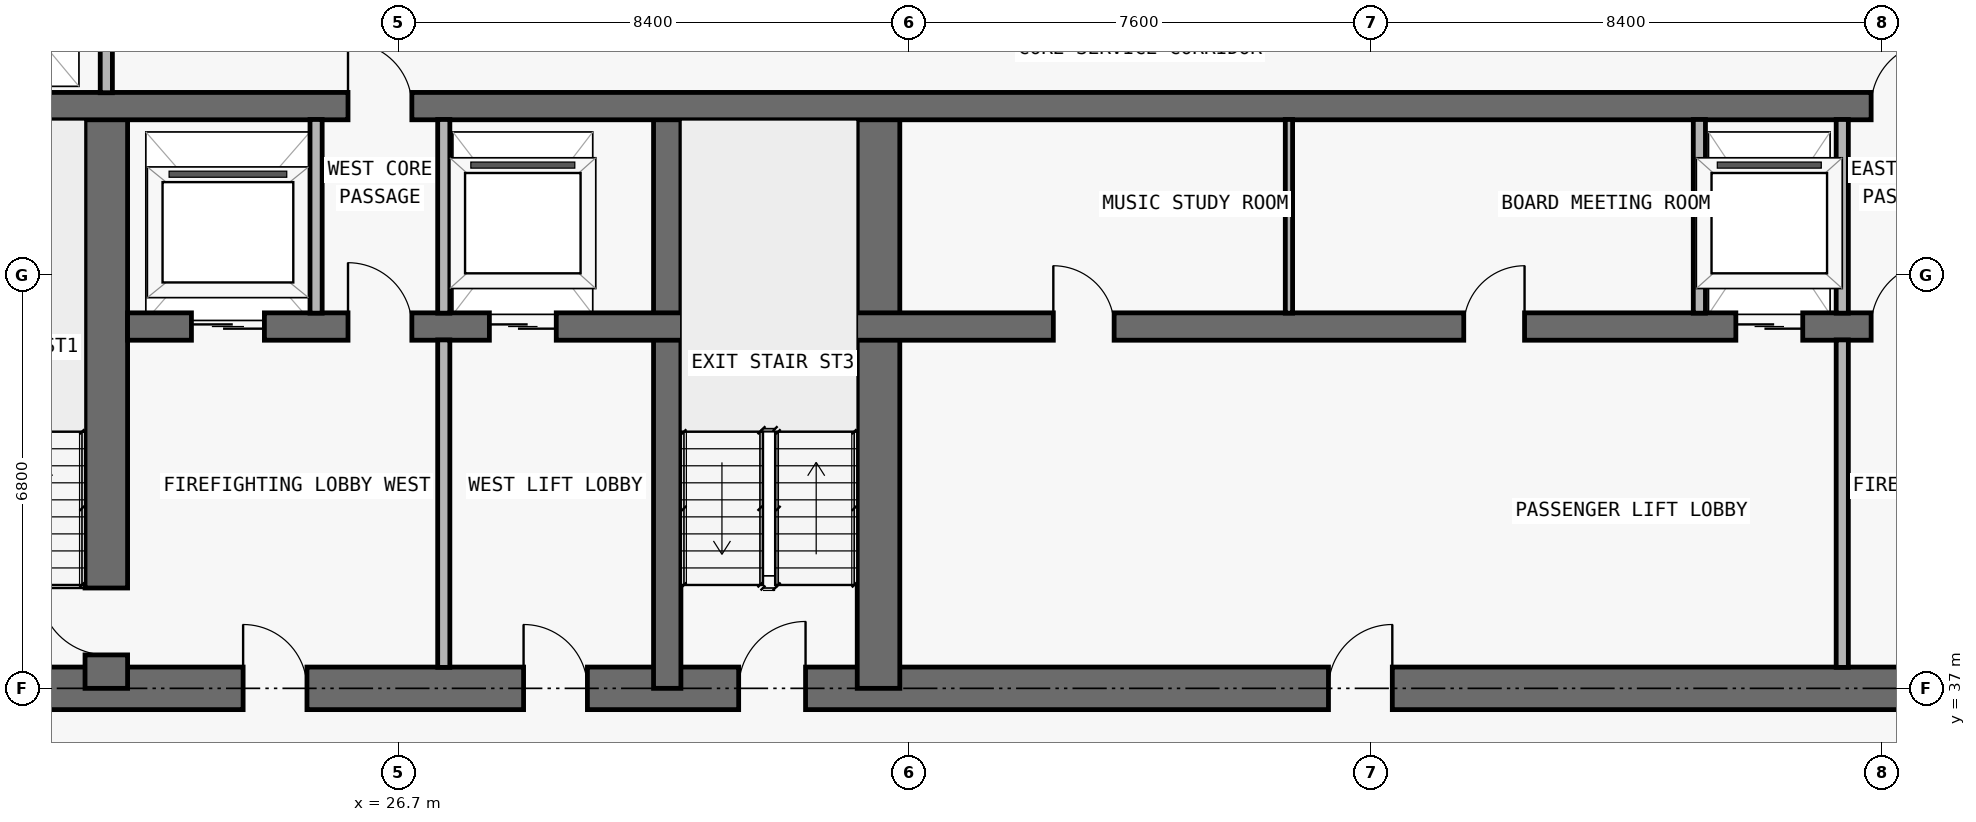
"""IFC4 building model, lengths in metres.
Left out: names, types, materials, properties, quantities, classifications, styles, units other than length and angle.
Written with IfcOpenShell. Run it as: python <this file> out.ifc"""

import sys

from ifc_helpers import new_model, si_unit, direction, frame, frame_2d, origin, place, context, subcontext, project, spatial, rectangle, extrude, element, fill, save


model = new_model("IFC4")
c1 = context("Model", 3, precision=1e-05, world=origin(), true_north=direction((0.0, 1.0)))
c2 = subcontext(c1, "Body", "Model", "MODEL_VIEW")
j1 = project(units=[si_unit("LENGTHUNIT", "METRE"), si_unit("PLANEANGLEUNIT", "RADIAN")], contexts=[c1])
p1 = place(None, origin())
s1 = spatial("IfcSite", under=j1, at=p1, CompositionType="ELEMENT")
p2 = place(p1, origin())
s2 = spatial("IfcBuilding", under=s1, at=p2, CompositionType="ELEMENT")
p3 = place(p2, frame((0.0, 0.0, 208.2)))
s3 = spatial("IfcBuildingStorey", under=s2, at=p3, CompositionType="ELEMENT", Elevation=208.2)
p4 = place(p3, frame((17.95, 37.0, 0.0), z_axis=(0.0, 0.0, 1.0), x_axis=(1.0, 0.0, 0.0)))
e1 = element("IfcWall", 1, at=p4, inside=s3, PredefinedType="SHEAR", context=c2, shape_type="SweptSolid", body=[
    extrude(rectangle(XDim=41.9, YDim=0.7, at=frame_2d((20.95, 0.0))), origin(), (0.0, 0.0, 1.0), 3.05),
])
p5 = place(p4, frame((14.35, 0.0, 0.0)))
e2 = element("IfcOpeningElement", 2, at=p5, cuts=e1, PredefinedType="OPENING", context=c2, shape_type="SweptSolid", body=[
    extrude(rectangle(XDim=1.1, YDim=2.15, at=frame_2d((0.55, 1.075))), frame((0.0, 0.36, 0.0), z_axis=(0.0, -1.0, 0.0), x_axis=(1.0, 0.0, 0.0)), (0.0, 0.0, 1.0), 0.72),
])
p6 = place(p4, frame((6.2, 0.0, 0.0)))
e3 = element("IfcOpeningElement", 3, at=p6, cuts=e1, PredefinedType="OPENING", context=c2, shape_type="SweptSolid", body=[
    extrude(rectangle(XDim=1.05, YDim=2.15, at=frame_2d((0.525, 1.075))), frame((0.0, 0.36, 0.0), z_axis=(0.0, -1.0, 0.0), x_axis=(1.0, 0.0, 0.0)), (0.0, 0.0, 1.0), 0.72),
])
p7 = place(p4, frame((34.7, 0.0, 0.0)))
e4 = element("IfcOpeningElement", 4, at=p7, cuts=e1, PredefinedType="OPENING", context=c2, shape_type="SweptSolid", body=[
    extrude(rectangle(XDim=1.05, YDim=2.15, at=frame_2d((0.525, 1.075))), frame((0.0, 0.36, 0.0), z_axis=(0.0, -1.0, 0.0), x_axis=(1.0, 0.0, 0.0)), (0.0, 0.0, 1.0), 0.72),
])
p8 = place(p4, frame((10.812, 0.0, 0.0)))
e5 = element("IfcOpeningElement", 5, at=p8, cuts=e1, PredefinedType="OPENING", context=c2, shape_type="SweptSolid", body=[
    extrude(rectangle(XDim=1.05, YDim=2.15, at=frame_2d((0.525, 1.075))), frame((0.0, 0.36, 0.0), z_axis=(0.0, -1.0, 0.0), x_axis=(1.0, 0.0, 0.0)), (0.0, 0.0, 1.0), 0.72),
])
p9 = place(p4, frame((24.05, 0.0, 0.0)))
e6 = element("IfcOpeningElement", 6, at=p9, cuts=e1, PredefinedType="OPENING", context=c2, shape_type="SweptSolid", body=[
    extrude(rectangle(XDim=1.05, YDim=2.15, at=frame_2d((0.525, 1.075))), frame((0.0, 0.36, 0.0), z_axis=(0.0, -1.0, 0.0), x_axis=(1.0, 0.0, 0.0)), (0.0, 0.0, 1.0), 0.72),
])
p10 = place(p3, frame((21.9, 37.0, 0.0), z_axis=(0.0, 0.0, 1.0), x_axis=(0.0, 1.0, 0.0)))
e7 = element("IfcWall", 7, at=p10, inside=s3, PredefinedType="SHEAR", context=c2, shape_type="SweptSolid", body=[
    extrude(rectangle(XDim=9.575, YDim=0.7, at=frame_2d((4.788, 0.0))), origin(), (0.0, 0.0, 1.0), 3.05),
])
p11 = place(p10, frame((0.55, 0.0, 0.0)))
e8 = element("IfcOpeningElement", 8, at=p11, cuts=e7, PredefinedType="OPENING", context=c2, shape_type="SweptSolid", body=[
    extrude(rectangle(XDim=1.1, YDim=2.15, at=frame_2d((0.55, 1.075))), frame((0.0, 0.36, 0.0), z_axis=(0.0, -1.0, 0.0), x_axis=(1.0, 0.0, 0.0)), (0.0, 0.0, 1.0), 0.72),
])
p12 = place(p3, frame((31.125, 37.0, 0.0), z_axis=(0.0, 0.0, 1.0), x_axis=(0.0, 1.0, 0.0)))
e9 = element("IfcWall", 9, at=p12, inside=s3, PredefinedType="SHEAR", context=c2, shape_type="SweptSolid", body=[
    extrude(rectangle(XDim=9.575, YDim=0.45, at=frame_2d((4.788, 0.0))), origin(), (0.0, 0.0, 1.0), 3.05),
])
p13 = place(p3, frame((34.6, 37.0, 0.0), z_axis=(0.0, 0.0, 1.0), x_axis=(0.0, 1.0, 0.0)))
e10 = element("IfcWall", 10, at=p13, inside=s3, PredefinedType="SHEAR", context=c2, shape_type="SweptSolid", body=[
    extrude(rectangle(XDim=9.575, YDim=0.7, at=frame_2d((4.788, 0.0))), origin(), (0.0, 0.0, 1.0), 3.05),
])
p14 = place(p3, frame((22.25, 42.95, 0.0), z_axis=(0.0, 0.0, 1.0), x_axis=(1.0, 0.0, 0.0)))
e11 = element("IfcWall", 11, at=p14, inside=s3, PredefinedType="SHEAR", context=c2, shape_type="SweptSolid", body=[
    extrude(rectangle(XDim=33.3, YDim=0.45, at=frame_2d((16.65, 0.0))), origin(), (0.0, 0.0, 1.0), 3.05),
])
p15 = place(p14, frame((1.05, 0.0, 0.0)))
e12 = element("IfcOpeningElement", 12, at=p15, cuts=e11, PredefinedType="OPENING", context=c2, shape_type="SweptSolid", body=[
    extrude(rectangle(XDim=1.2, YDim=2.2, at=frame_2d((0.6, 1.1))), frame((0.0, 0.235, 0.0), z_axis=(0.0, -1.0, 0.0), x_axis=(1.0, 0.0, 0.0)), (0.0, 0.0, 1.0), 0.47),
])
p16 = place(p14, frame((31.05, 0.0, 0.0)))
e13 = element("IfcOpeningElement", 13, at=p16, cuts=e11, PredefinedType="OPENING", context=c2, shape_type="SweptSolid", body=[
    extrude(rectangle(XDim=1.2, YDim=2.2, at=frame_2d((0.6, 1.1))), frame((0.0, 0.235, 0.0), z_axis=(0.0, -1.0, 0.0), x_axis=(1.0, 0.0, 0.0)), (0.0, 0.0, 1.0), 0.47),
])
p17 = place(p14, frame((26.45, 0.0, 0.0)))
e14 = element("IfcOpeningElement", 14, at=p17, cuts=e11, PredefinedType="OPENING", context=c2, shape_type="SweptSolid", body=[
    extrude(rectangle(XDim=1.1, YDim=2.2, at=frame_2d((0.55, 1.1))), frame((0.0, 0.235, 0.0), z_axis=(0.0, -1.0, 0.0), x_axis=(1.0, 0.0, 0.0)), (0.0, 0.0, 1.0), 0.47),
])
p18 = place(p14, frame((5.95, 0.0, 0.0)))
e15 = element("IfcOpeningElement", 15, at=p18, cuts=e11, PredefinedType="OPENING", context=c2, shape_type="SweptSolid", body=[
    extrude(rectangle(XDim=1.1, YDim=2.2, at=frame_2d((0.55, 1.1))), frame((0.0, 0.235, 0.0), z_axis=(0.0, -1.0, 0.0), x_axis=(1.0, 0.0, 0.0)), (0.0, 0.0, 1.0), 0.47),
])
p19 = place(p14, frame((3.625, 0.0, 0.0)))
e16 = element("IfcOpeningElement", 16, at=p19, cuts=e11, PredefinedType="OPENING", context=c2, shape_type="SweptSolid", body=[
    extrude(rectangle(XDim=1.05, YDim=2.15, at=frame_2d((0.525, 1.075))), frame((0.0, 0.235, 0.0), z_axis=(0.0, -1.0, 0.0), x_axis=(1.0, 0.0, 0.0)), (0.0, 0.0, 1.0), 0.47),
])
p20 = place(p14, frame((28.675, 0.0, 0.0)))
e17 = element("IfcOpeningElement", 17, at=p20, cuts=e11, PredefinedType="OPENING", context=c2, shape_type="SweptSolid", body=[
    extrude(rectangle(XDim=1.05, YDim=2.15, at=frame_2d((0.525, 1.075))), frame((0.0, 0.235, 0.0), z_axis=(0.0, -1.0, 0.0), x_axis=(1.0, 0.0, 0.0)), (0.0, 0.0, 1.0), 0.47),
])
p21 = place(p14, frame((15.225, 0.0, 0.0)))
e18 = element("IfcOpeningElement", 18, at=p21, cuts=e11, PredefinedType="OPENING", context=c2, shape_type="SweptSolid", body=[
    extrude(rectangle(XDim=1.0, YDim=2.2, at=frame_2d((0.5, 1.1))), frame((0.0, 0.235, 0.0), z_axis=(0.0, -1.0, 0.0), x_axis=(1.0, 0.0, 0.0)), (0.0, 0.0, 1.0), 0.47),
])
p22 = place(p14, frame((21.975, 0.0, 0.0)))
e19 = element("IfcOpeningElement", 19, at=p22, cuts=e11, PredefinedType="OPENING", context=c2, shape_type="SweptSolid", body=[
    extrude(rectangle(XDim=1.0, YDim=2.2, at=frame_2d((0.5, 1.1))), frame((0.0, 0.235, 0.0), z_axis=(0.0, -1.0, 0.0), x_axis=(1.0, 0.0, 0.0)), (0.0, 0.0, 1.0), 0.47),
])
p23 = place(p3, frame((18.3, 46.575, 0.0), z_axis=(0.0, 0.0, 1.0), x_axis=(1.0, 0.0, 0.0)))
e20 = element("IfcWall", 20, at=p23, inside=s3, PredefinedType="SHEAR", context=c2, shape_type="SweptSolid", body=[
    extrude(rectangle(XDim=41.2, YDim=0.45, at=frame_2d((20.6, 0.0))), origin(), (0.0, 0.0, 1.0), 3.05),
])
p24 = place(p23, frame((7.575, 0.0, 0.0)))
e21 = element("IfcOpeningElement", 21, at=p24, cuts=e20, PredefinedType="OPENING", context=c2, shape_type="SweptSolid", body=[
    extrude(rectangle(XDim=1.05, YDim=2.15, at=frame_2d((0.525, 1.075))), frame((0.0, 0.235, 0.0), z_axis=(0.0, -1.0, 0.0), x_axis=(1.0, 0.0, 0.0)), (0.0, 0.0, 1.0), 0.47),
])
p25 = place(p23, frame((32.625, 0.0, 0.0)))
e22 = element("IfcOpeningElement", 22, at=p25, cuts=e20, PredefinedType="OPENING", context=c2, shape_type="SweptSolid", body=[
    extrude(rectangle(XDim=1.05, YDim=2.15, at=frame_2d((0.525, 1.075))), frame((0.0, 0.235, 0.0), z_axis=(0.0, -1.0, 0.0), x_axis=(1.0, 0.0, 0.0)), (0.0, 0.0, 1.0), 0.47),
])
p26 = place(p3, frame((21.9, 46.795, 0.0), z_axis=(0.0, 0.0, 1.0), x_axis=(0.0, 1.0, 0.0)))
e23 = element("IfcWall", 23, at=p26, inside=s3, PredefinedType="PARTITIONING", context=c2, shape_type="SweptSolid", body=[
    extrude(rectangle(XDim=3.16, YDim=0.2, at=frame_2d((1.58, 0.0))), origin(), (0.0, 0.0, 1.0), 3.05),
])
p27 = place(p3, frame((25.35, 43.17, 0.0), z_axis=(0.0, 0.0, 1.0), x_axis=(0.0, 1.0, 0.0)))
e24 = element("IfcWall", 24, at=p27, inside=s3, PredefinedType="PARTITIONING", context=c2, shape_type="SweptSolid", body=[
    extrude(rectangle(XDim=3.185, YDim=0.2, at=frame_2d((1.593, 0.0))), origin(), (0.0, 0.0, 1.0), 3.05),
])
p28 = place(p3, frame((27.45, 37.345, 0.0), z_axis=(0.0, 0.0, 1.0), x_axis=(0.0, 1.0, 0.0)))
e25 = element("IfcWall", 25, at=p28, inside=s3, PredefinedType="PARTITIONING", context=c2, shape_type="SweptSolid", body=[
    extrude(rectangle(XDim=5.385, YDim=0.2, at=frame_2d((2.692, 0.0))), origin(), (0.0, 0.0, 1.0), 3.05),
])
p29 = place(p3, frame((27.45, 43.17, 0.0), z_axis=(0.0, 0.0, 1.0), x_axis=(0.0, 1.0, 0.0)))
e26 = element("IfcWall", 26, at=p29, inside=s3, PredefinedType="PARTITIONING", context=c2, shape_type="SweptSolid", body=[
    extrude(rectangle(XDim=3.185, YDim=0.2, at=frame_2d((1.593, 0.0))), origin(), (0.0, 0.0, 1.0), 3.05),
])
p30 = place(p3, frame((41.35, 43.17, 0.0), z_axis=(0.0, 0.0, 1.0), x_axis=(0.0, 1.0, 0.0)))
e27 = element("IfcWall", 27, at=p30, inside=s3, PredefinedType="PARTITIONING", context=c2, shape_type="SweptSolid", body=[
    extrude(rectangle(XDim=3.185, YDim=0.12, at=frame_2d((1.593, 0.0))), origin(), (0.0, 0.0, 1.0), 3.05),
])
p31 = place(p3, frame((48.1, 43.17, 0.0), z_axis=(0.0, 0.0, 1.0), x_axis=(0.0, 1.0, 0.0)))
e28 = element("IfcWall", 28, at=p31, inside=s3, PredefinedType="PARTITIONING", context=c2, shape_type="SweptSolid", body=[
    extrude(rectangle(XDim=3.185, YDim=0.2, at=frame_2d((1.593, 0.0))), origin(), (0.0, 0.0, 1.0), 3.05),
])
p32 = place(p3, frame((50.45, 37.345, 0.0), z_axis=(0.0, 0.0, 1.0), x_axis=(0.0, 1.0, 0.0)))
e29 = element("IfcWall", 29, at=p32, inside=s3, PredefinedType="PARTITIONING", context=c2, shape_type="SweptSolid", body=[
    extrude(rectangle(XDim=5.385, YDim=0.2, at=frame_2d((2.692, 0.0))), origin(), (0.0, 0.0, 1.0), 3.05),
])
p33 = place(p3, frame((50.45, 43.17, 0.0), z_axis=(0.0, 0.0, 1.0), x_axis=(0.0, 1.0, 0.0)))
e30 = element("IfcWall", 30, at=p33, inside=s3, PredefinedType="PARTITIONING", context=c2, shape_type="SweptSolid", body=[
    extrude(rectangle(XDim=3.185, YDim=0.2, at=frame_2d((1.593, 0.0))), origin(), (0.0, 0.0, 1.0), 3.05),
])
p34 = place(p15, origin())
e31 = element("IfcDoor", 31, at=p34, inside=s3, OperationType="DOUBLE_DOOR_SLIDING", PredefinedType="DOOR", context=c2, shape_type="SweptSolid", body=[
    extrude(rectangle(XDim=1.2, YDim=2.2, at=frame_2d((0.6, 1.1))), frame((0.0, 0.025, 0.0), z_axis=(0.0, -1.0, 0.0), x_axis=(1.0, 0.0, 0.0)), (0.0, 0.0, 1.0), 0.05),
])
fill(e12, e31)
p35 = place(p17, origin())
e32 = element("IfcDoor", 32, at=p35, inside=s3, OperationType="DOUBLE_DOOR_SLIDING", PredefinedType="DOOR", context=c2, shape_type="SweptSolid", body=[
    extrude(rectangle(XDim=1.1, YDim=2.2, at=frame_2d((0.55, 1.1))), frame((0.0, 0.025, 0.0), z_axis=(0.0, -1.0, 0.0), x_axis=(1.0, 0.0, 0.0)), (0.0, 0.0, 1.0), 0.05),
])
fill(e14, e32)
p36 = place(p18, origin())
e33 = element("IfcDoor", 33, at=p36, inside=s3, OperationType="DOUBLE_DOOR_SLIDING", PredefinedType="DOOR", context=c2, shape_type="SweptSolid", body=[
    extrude(rectangle(XDim=1.1, YDim=2.2, at=frame_2d((0.55, 1.1))), frame((0.0, 0.025, 0.0), z_axis=(0.0, -1.0, 0.0), x_axis=(1.0, 0.0, 0.0)), (0.0, 0.0, 1.0), 0.05),
])
fill(e15, e33)
p37 = place(p5, origin())
e34 = element("IfcDoor", 34, at=p37, inside=s3, OperationType="SINGLE_SWING_RIGHT", PredefinedType="DOOR", context=c2, shape_type="SweptSolid", body=[
    extrude(rectangle(XDim=1.1, YDim=2.15, at=frame_2d((0.55, 1.075))), frame((0.0, 0.025, 0.0), z_axis=(0.0, -1.0, 0.0), x_axis=(1.0, 0.0, 0.0)), (0.0, 0.0, 1.0), 0.05),
])
fill(e2, e34)
p38 = place(p6, origin())
e35 = element("IfcDoor", 35, at=p38, inside=s3, OperationType="SINGLE_SWING_LEFT", PredefinedType="DOOR", context=c2, shape_type="SweptSolid", body=[
    extrude(rectangle(XDim=1.05, YDim=2.15, at=frame_2d((0.525, 1.075))), frame((0.0, 0.025, 0.0), z_axis=(0.0, -1.0, 0.0), x_axis=(1.0, 0.0, 0.0)), (0.0, 0.0, 1.0), 0.05),
])
fill(e3, e35)
p39 = place(p11, origin())
e36 = element("IfcDoor", 36, at=p39, inside=s3, OperationType="SINGLE_SWING_RIGHT", PredefinedType="DOOR", context=c2, shape_type="SweptSolid", body=[
    extrude(rectangle(XDim=1.1, YDim=2.15, at=frame_2d((0.55, 1.075))), frame((0.0, 0.025, 0.0), z_axis=(0.0, -1.0, 0.0), x_axis=(1.0, 0.0, 0.0)), (0.0, 0.0, 1.0), 0.05),
])
fill(e8, e36)
p40 = place(p19, origin())
e37 = element("IfcDoor", 37, at=p40, inside=s3, OperationType="SINGLE_SWING_LEFT", PredefinedType="DOOR", context=c2, shape_type="SweptSolid", body=[
    extrude(rectangle(XDim=1.05, YDim=2.15, at=frame_2d((0.525, 1.075))), frame((0.0, 0.025, 0.0), z_axis=(0.0, -1.0, 0.0), x_axis=(1.0, 0.0, 0.0)), (0.0, 0.0, 1.0), 0.05),
])
fill(e16, e37)
p41 = place(p20, origin())
e38 = element("IfcDoor", 38, at=p41, inside=s3, OperationType="SINGLE_SWING_RIGHT", PredefinedType="DOOR", context=c2, shape_type="SweptSolid", body=[
    extrude(rectangle(XDim=1.05, YDim=2.15, at=frame_2d((0.525, 1.075))), frame((0.0, 0.025, 0.0), z_axis=(0.0, -1.0, 0.0), x_axis=(1.0, 0.0, 0.0)), (0.0, 0.0, 1.0), 0.05),
])
fill(e17, e38)
p42 = place(p8, origin())
e39 = element("IfcDoor", 39, at=p42, inside=s3, OperationType="SINGLE_SWING_LEFT", PredefinedType="DOOR", context=c2, shape_type="SweptSolid", body=[
    extrude(rectangle(XDim=1.05, YDim=2.15, at=frame_2d((0.525, 1.075))), frame((0.0, 0.025, 0.0), z_axis=(0.0, -1.0, 0.0), x_axis=(1.0, 0.0, 0.0)), (0.0, 0.0, 1.0), 0.05),
])
fill(e5, e39)
p43 = place(p9, origin())
e40 = element("IfcDoor", 40, at=p43, inside=s3, OperationType="SINGLE_SWING_RIGHT", PredefinedType="DOOR", context=c2, shape_type="SweptSolid", body=[
    extrude(rectangle(XDim=1.05, YDim=2.15, at=frame_2d((0.525, 1.075))), frame((0.0, 0.025, 0.0), z_axis=(0.0, -1.0, 0.0), x_axis=(1.0, 0.0, 0.0)), (0.0, 0.0, 1.0), 0.05),
])
fill(e6, e40)
p44 = place(p21, origin())
e41 = element("IfcDoor", 41, at=p44, inside=s3, OperationType="SINGLE_SWING_LEFT", PredefinedType="DOOR", context=c2, shape_type="SweptSolid", body=[
    extrude(rectangle(XDim=1.0, YDim=2.2, at=frame_2d((0.5, 1.1))), frame((0.0, 0.025, 0.0), z_axis=(0.0, -1.0, 0.0), x_axis=(1.0, 0.0, 0.0)), (0.0, 0.0, 1.0), 0.05),
])
fill(e18, e41)
p45 = place(p22, origin())
e42 = element("IfcDoor", 42, at=p45, inside=s3, OperationType="SINGLE_SWING_RIGHT", PredefinedType="DOOR", context=c2, shape_type="SweptSolid", body=[
    extrude(rectangle(XDim=1.0, YDim=2.2, at=frame_2d((0.5, 1.1))), frame((0.0, 0.025, 0.0), z_axis=(0.0, -1.0, 0.0), x_axis=(1.0, 0.0, 0.0)), (0.0, 0.0, 1.0), 0.05),
])
fill(e19, e42)
p46 = place(p24, origin())
e43 = element("IfcDoor", 43, at=p46, inside=s3, OperationType="SINGLE_SWING_LEFT", PredefinedType="DOOR", context=c2, shape_type="SweptSolid", body=[
    extrude(rectangle(XDim=1.05, YDim=2.15, at=frame_2d((0.525, 1.075))), frame((0.0, 0.025, 0.0), z_axis=(0.0, -1.0, 0.0), x_axis=(1.0, 0.0, 0.0)), (0.0, 0.0, 1.0), 0.05),
])
fill(e21, e43)
p47 = place(p25, origin())
e44 = element("IfcDoor", 44, at=p47, inside=s3, OperationType="SINGLE_SWING_RIGHT", PredefinedType="DOOR", context=c2, shape_type="SweptSolid", body=[
    extrude(rectangle(XDim=1.05, YDim=2.15, at=frame_2d((0.525, 1.075))), frame((0.0, 0.025, 0.0), z_axis=(0.0, -1.0, 0.0), x_axis=(1.0, 0.0, 0.0)), (0.0, 0.0, 1.0), 0.05),
])
fill(e22, e44)
save(model, sys.argv[1])
